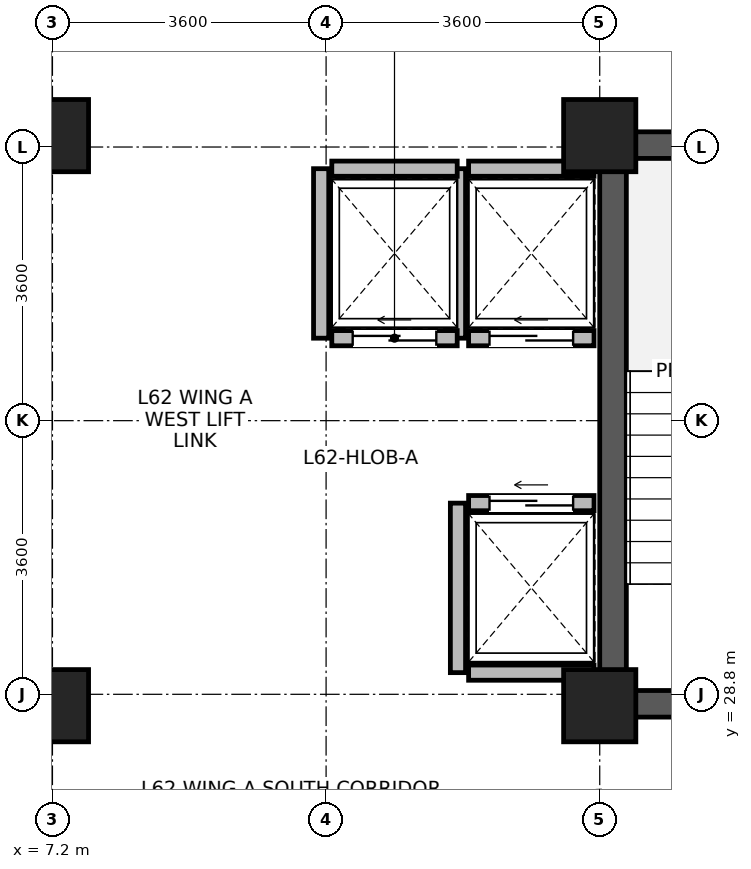
"""IFC4 building model, lengths in metres.
Left out: names, types, materials, properties, quantities, classifications, styles, units other than length and angle.
Written with IfcOpenShell. Run it as: python <this file> out.ifc"""

import sys

from ifc_helpers import new_model, si_unit, direction, frame, frame_2d, origin, origin_2d, place, context, subcontext, project, spatial, rectangle, extrude, source, transform, mapped, element, fill, save


model = new_model("IFC4")
c1 = context("Model", 3, precision=1e-05, world=origin(), true_north=direction((0.0, 1.0)))
c2 = subcontext(c1, "Body", "Model", "MODEL_VIEW")
j1 = project(units=[si_unit("LENGTHUNIT", "METRE"), si_unit("PLANEANGLEUNIT", "RADIAN")], contexts=[c1])
p1 = place(None, origin())
s1 = spatial("IfcSite", under=j1, at=p1, CompositionType="ELEMENT")
p2 = place(p1, origin())
s2 = spatial("IfcBuilding", under=s1, at=p2, CompositionType="ELEMENT")
p3 = place(p2, frame((0.0, 0.0, 242.5)))
s3 = spatial("IfcBuildingStorey", under=s2, at=p3, CompositionType="ELEMENT", Elevation=242.5)
p4 = place(p3, frame((14.575, 28.5, 0.0), z_axis=(0.0, 0.0, 1.0), x_axis=(0.0, 1.0, 0.0)))
e1 = element("IfcWall", 1, at=p4, inside=s3, PredefinedType="SHEAR", context=c2, shape_type="SweptSolid", body=[
    extrude(rectangle(XDim=7.7, YDim=0.35, at=frame_2d((3.85, 0.0))), origin(), (0.0, 0.0, 1.0), 3.44),
])
for number, where, z_axis, x_axis in (
    (2, (14.75, 28.675, 0.0), (0.0, 0.0, 1.0), (1.0, 0.0, 0.0)),
    (3, (14.75, 36.025, 0.0), (0.0, 0.0, 1.0), (1.0, 0.0, 0.0)),
):
    element("IfcWall", number, at=place(p3, frame(where, z_axis=z_axis, x_axis=x_axis)), inside=s3, PredefinedType="SHEAR", context=c2, shape_type="SweptSolid", body=[
        extrude(rectangle(XDim=3.2, YDim=0.35, at=frame_2d((1.6, 0.0))), origin(), (0.0, 0.0, 1.0), 3.44),
    ])
m1 = source(origin(), c2, "Body", "SweptSolid", [
    extrude(rectangle(XDim=0.95, YDim=0.95, at=origin_2d()), origin(), (0.0, 0.0, 1.0), 3.7),
])
for number, where, z_axis, x_axis in (
    (4, (7.2, 28.65, 0.0), (0.0, 0.0, 1.0), (1.0, 0.0, 0.0)),
    (5, (7.2, 36.15, 0.0), (0.0, 0.0, 1.0), (1.0, 0.0, 0.0)),
    (6, (14.4, 28.65, 0.0), (0.0, 0.0, 1.0), (1.0, 0.0, 0.0)),
    (7, (14.4, 36.15, 0.0), (0.0, 0.0, 1.0), (1.0, 0.0, 0.0)),
):
    element("IfcColumn", number, at=place(p3, frame(where, z_axis=z_axis, x_axis=x_axis)), inside=s3, PredefinedType="COLUMN", context=c2, shape_type="MappedRepresentation", body=[
        mapped(m1, transform((0.0, 0.0, 0.0), x_axis=(1.0, 0.0, 0.0), y_axis=(0.0, 1.0, 0.0), z_axis=(0.0, 0.0, 1.0), scale=1.0)),
    ])
p5 = place(p3, frame((12.675, 33.485, 0.0), z_axis=(0.0, 0.0, 1.0), x_axis=(1.0, 0.0, 0.0)))
e8 = element("IfcWall", 8, at=p5, inside=s3, PredefinedType="PARTITIONING", context=c2, shape_type="SweptSolid", body=[
    extrude(rectangle(XDim=1.65, YDim=0.2, at=frame_2d((0.825, 0.0))), origin(), (0.0, 0.0, 1.0), 3.42),
])
p6 = place(p5, frame((0.275, 0.0, 0.0)))
e9 = element("IfcOpeningElement", 9, at=p6, cuts=e8, PredefinedType="OPENING", context=c2, shape_type="SweptSolid", body=[
    extrude(rectangle(XDim=1.1, YDim=2.12, at=frame_2d((0.55, 1.06))), frame((0.0, 0.11, 0.0), z_axis=(0.0, -1.0, 0.0), x_axis=(1.0, 0.0, 0.0)), (0.0, 0.0, 1.0), 0.22),
])
p7 = place(p3, frame((12.675, 35.715, 0.0), z_axis=(0.0, 0.0, 1.0), x_axis=(1.0, 0.0, 0.0)))
e10 = element("IfcWall", 10, at=p7, inside=s3, PredefinedType="PARTITIONING", context=c2, shape_type="SweptSolid", body=[
    extrude(rectangle(XDim=1.65, YDim=0.2, at=frame_2d((0.825, 0.0))), origin(), (0.0, 0.0, 1.0), 3.42),
])
p8 = place(p3, frame((12.535, 33.485, 0.0), z_axis=(0.0, 0.0, 1.0), x_axis=(0.0, 1.0, 0.0)))
e11 = element("IfcWall", 11, at=p8, inside=s3, PredefinedType="PARTITIONING", context=c2, shape_type="SweptSolid", body=[
    extrude(rectangle(XDim=2.23, YDim=0.2, at=frame_2d((1.115, 0.0))), origin(), (0.0, 0.0, 1.0), 3.42),
])
p9 = place(p3, frame((12.675, 29.085, 0.0), z_axis=(0.0, 0.0, 1.0), x_axis=(1.0, 0.0, 0.0)))
e12 = element("IfcWall", 12, at=p9, inside=s3, PredefinedType="PARTITIONING", context=c2, shape_type="SweptSolid", body=[
    extrude(rectangle(XDim=1.65, YDim=0.2, at=frame_2d((0.825, 0.0))), origin(), (0.0, 0.0, 1.0), 3.42),
])
p10 = place(p3, frame((12.675, 31.315, 0.0), z_axis=(0.0, 0.0, 1.0), x_axis=(1.0, 0.0, 0.0)))
e13 = element("IfcWall", 13, at=p10, inside=s3, PredefinedType="PARTITIONING", context=c2, shape_type="SweptSolid", body=[
    extrude(rectangle(XDim=1.65, YDim=0.2, at=frame_2d((0.825, 0.0))), origin(), (0.0, 0.0, 1.0), 3.42),
])
p11 = place(p10, frame((0.275, 0.0, 0.0)))
e14 = element("IfcOpeningElement", 14, at=p11, cuts=e13, PredefinedType="OPENING", context=c2, shape_type="SweptSolid", body=[
    extrude(rectangle(XDim=1.1, YDim=2.12, at=frame_2d((0.55, 1.06))), frame((0.0, 0.11, 0.0), z_axis=(0.0, -1.0, 0.0), x_axis=(1.0, 0.0, 0.0)), (0.0, 0.0, 1.0), 0.22),
])
p12 = place(p3, frame((12.535, 29.085, 0.0), z_axis=(0.0, 0.0, 1.0), x_axis=(0.0, 1.0, 0.0)))
e15 = element("IfcWall", 15, at=p12, inside=s3, PredefinedType="PARTITIONING", context=c2, shape_type="SweptSolid", body=[
    extrude(rectangle(XDim=2.23, YDim=0.2, at=frame_2d((1.115, 0.0))), origin(), (0.0, 0.0, 1.0), 3.42),
])
p13 = place(p3, frame((10.875, 33.485, 0.0), z_axis=(0.0, 0.0, 1.0), x_axis=(1.0, 0.0, 0.0)))
e16 = element("IfcWall", 16, at=p13, inside=s3, PredefinedType="PARTITIONING", context=c2, shape_type="SweptSolid", body=[
    extrude(rectangle(XDim=1.65, YDim=0.2, at=frame_2d((0.825, 0.0))), origin(), (0.0, 0.0, 1.0), 3.42),
])
p14 = place(p13, frame((0.275, 0.0, 0.0)))
e17 = element("IfcOpeningElement", 17, at=p14, cuts=e16, PredefinedType="OPENING", context=c2, shape_type="SweptSolid", body=[
    extrude(rectangle(XDim=1.1, YDim=2.12, at=frame_2d((0.55, 1.06))), frame((0.0, 0.11, 0.0), z_axis=(0.0, -1.0, 0.0), x_axis=(1.0, 0.0, 0.0)), (0.0, 0.0, 1.0), 0.22),
])
p15 = place(p3, frame((10.875, 35.715, 0.0), z_axis=(0.0, 0.0, 1.0), x_axis=(1.0, 0.0, 0.0)))
e18 = element("IfcWall", 18, at=p15, inside=s3, PredefinedType="PARTITIONING", context=c2, shape_type="SweptSolid", body=[
    extrude(rectangle(XDim=1.65, YDim=0.2, at=frame_2d((0.825, 0.0))), origin(), (0.0, 0.0, 1.0), 3.42),
])
p16 = place(p3, frame((10.735, 33.485, 0.0), z_axis=(0.0, 0.0, 1.0), x_axis=(0.0, 1.0, 0.0)))
e19 = element("IfcWall", 19, at=p16, inside=s3, PredefinedType="PARTITIONING", context=c2, shape_type="SweptSolid", body=[
    extrude(rectangle(XDim=2.23, YDim=0.2, at=frame_2d((1.115, 0.0))), origin(), (0.0, 0.0, 1.0), 3.42),
])
p17 = place(p6, origin())
e20 = element("IfcDoor", 20, at=p17, inside=s3, OperationType="SLIDING_TO_LEFT", PredefinedType="DOOR", context=c2, shape_type="SweptSolid", body=[
    extrude(rectangle(XDim=1.1, YDim=2.12, at=frame_2d((0.55, 1.06))), frame((0.0, 0.025, 0.0), z_axis=(0.0, -1.0, 0.0), x_axis=(1.0, 0.0, 0.0)), (0.0, 0.0, 1.0), 0.05),
])
fill(e9, e20)
p18 = place(p11, origin())
e21 = element("IfcDoor", 21, at=p18, inside=s3, OperationType="SLIDING_TO_LEFT", PredefinedType="DOOR", context=c2, shape_type="SweptSolid", body=[
    extrude(rectangle(XDim=1.1, YDim=2.12, at=frame_2d((0.55, 1.06))), frame((0.0, 0.025, 0.0), z_axis=(0.0, -1.0, 0.0), x_axis=(1.0, 0.0, 0.0)), (0.0, 0.0, 1.0), 0.05),
])
fill(e14, e21)
p19 = place(p14, origin())
e22 = element("IfcDoor", 22, at=p19, inside=s3, OperationType="SLIDING_TO_LEFT", PredefinedType="DOOR", context=c2, shape_type="SweptSolid", body=[
    extrude(rectangle(XDim=1.1, YDim=2.12, at=frame_2d((0.55, 1.06))), frame((0.0, 0.025, 0.0), z_axis=(0.0, -1.0, 0.0), x_axis=(1.0, 0.0, 0.0)), (0.0, 0.0, 1.0), 0.05),
])
fill(e17, e22)
save(model, sys.argv[1])
